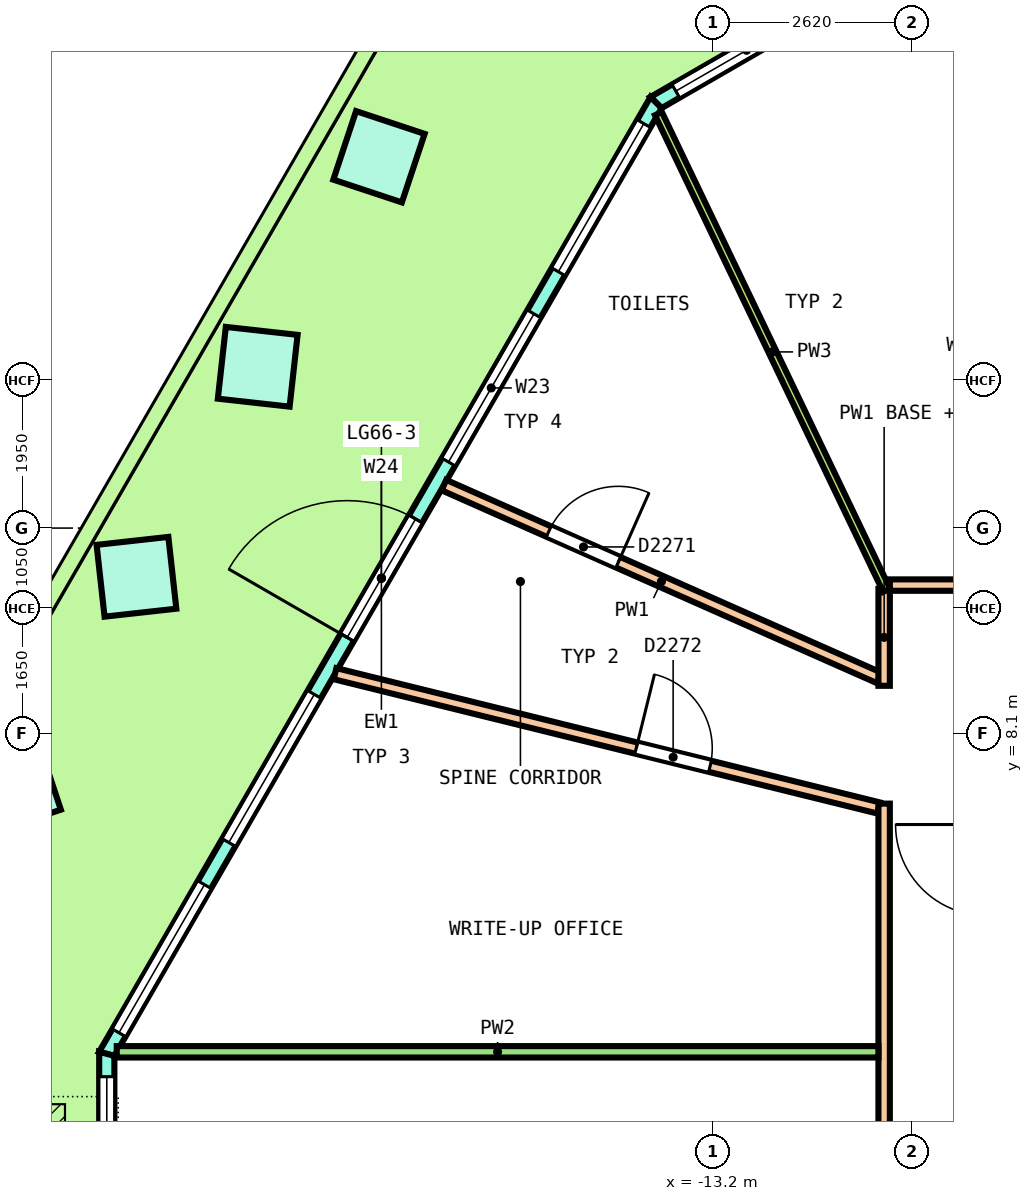
"""IFC4 building model, lengths in metres.
Left out: names, types, materials, properties, quantities, classifications, styles, units other than length and angle.
Written with IfcOpenShell. Run it as: python <this file> out.ifc"""

import sys

from ifc_helpers import new_model, si_unit, direction, frame, frame_2d, origin, origin_2d, place, context, subcontext, project, spatial, polyline, rectangle, outline, extrude, element, fill, save


model = new_model("IFC4")
c1 = context("Model", 3, precision=1e-05, world=origin(), true_north=direction((0.0, 1.0)))
c2 = subcontext(c1, "Body", "Model", "MODEL_VIEW")
j1 = project(units=[si_unit("LENGTHUNIT", "METRE"), si_unit("PLANEANGLEUNIT", "RADIAN")], contexts=[c1])
p1 = place(None, origin())
s1 = spatial("IfcSite", under=j1, at=p1, CompositionType="ELEMENT")
p2 = place(p1, origin())
s2 = spatial("IfcBuilding", under=s1, at=p2, CompositionType="ELEMENT")
p3 = place(p2, frame((0.0, 0.0, 299.0)))
s3 = spatial("IfcBuildingStorey", under=s2, at=p3, CompositionType="ELEMENT", Elevation=299.0)
p4 = place(p3, frame((-17.596, 15.685, 0.0), z_axis=(0.281574618215, -0.054168736457, 0.958009124366), x_axis=(-0.47558599124, -0.875021577667, 0.090306165648)))
e1 = element("IfcColumn", 1, at=p4, inside=s3, PredefinedType="COLUMN", context=c2, shape_type="SweptSolid", body=[
    extrude(rectangle(XDim=0.95, YDim=0.95, at=origin_2d()), origin(), (0.0, 0.0, 1.0), 3.799),
])
for number, where, z_axis, x_axis in (
    (2, (-19.191, 12.922, 0.0), (0.251, -0.109, 0.962), (-0.492, -0.87, 0.03)),
    (3, (-20.787, 10.159, 0.0), (0.22, -0.163, 0.962), (-0.507, -0.861, -0.03)),
):
    element("IfcColumn", number, at=place(p3, frame(where, z_axis=z_axis, x_axis=x_axis)), inside=s3, PredefinedType="COLUMN", context=c2, shape_type="SweptSolid", body=[
        extrude(rectangle(XDim=0.95, YDim=0.95, at=origin_2d()), origin(), (0.0, 0.0, 1.0), 3.795),
    ])
p5 = place(p3, frame((-22.382, 7.396, 0.0), z_axis=(0.187758226885, -0.216738021658, 0.958003903022), x_axis=(-0.519767268221, -0.849519403482, -0.090325909867)))
e4 = element("IfcColumn", 4, at=p5, inside=s3, PredefinedType="COLUMN", context=c2, shape_type="SweptSolid", body=[
    extrude(rectangle(XDim=0.95, YDim=0.95, at=origin_2d()), origin(), (0.0, 0.0, 1.0), 3.8),
])
p6 = place(p3, frame((-9.185, 19.15, 0.0), z_axis=(0.0, 0.0, 1.0), x_axis=(-0.866026017613, -0.499998936816, 0.0)))
e5 = element("IfcWall", 5, at=p6, inside=s3, PredefinedType="SOLIDWALL", context=c2, shape_type="SweptSolid", body=[
    extrude(outline(polyline([(-0.027, -0.1), (1.084, -0.1), (2.196, -0.1), (3.307, -0.1), (4.419, -0.1), (5.53, -0.1), (5.477, 0.1), (4.387, 0.1), (3.297, 0.1), (2.207, 0.1), (1.117, 0.1), (0.027, 0.1), (-0.027, -0.1)])), origin(), (0.0, 0.0, 1.0), 3.7),
])
p7 = place(p6, frame((0.301, 0.0, 0.1)))
e6 = element("IfcOpeningElement", 6, at=p7, cuts=e5, PredefinedType="OPENING", context=c2, shape_type="SweptSolid", body=[
    extrude(rectangle(XDim=2.15, YDim=2.75, at=frame_2d((1.075, 1.375))), frame((0.0, 0.11, 0.0), z_axis=(0.0, -1.0, 0.0), x_axis=(1.0, 0.0, 0.0)), (0.0, 0.0, 1.0), 0.22),
])
p8 = place(p6, frame((3.052, 0.0, 0.1)))
e7 = element("IfcOpeningElement", 7, at=p8, cuts=e5, PredefinedType="OPENING", context=c2, shape_type="SweptSolid", body=[
    extrude(rectangle(XDim=2.15, YDim=2.75, at=frame_2d((1.075, 1.375))), frame((0.0, 0.11, 0.0), z_axis=(0.0, -1.0, 0.0), x_axis=(1.0, 0.0, 0.0)), (0.0, 0.0, 1.0), 0.22),
])
p9 = place(p3, frame((-13.951, 16.398, 0.0), z_axis=(0.0, 0.0, 1.0), x_axis=(-0.499998359168, -0.866026351117, 0.0)))
e8 = element("IfcWall", 8, at=p9, inside=s3, PredefinedType="SOLIDWALL", context=c2, shape_type="SweptSolid", body=[
    extrude(outline(polyline([(-0.027, -0.1), (1.009, -0.1), (2.045, -0.1), (3.081, -0.1), (4.117, -0.1), (5.154, -0.1), (6.189, -0.1), (7.226, -0.1), (8.262, -0.1), (9.298, -0.1), (10.334, -0.1), (11.37, -0.1), (12.406, -0.1), (13.442, -0.1), (14.478, -0.1), (14.424, 0.1), (13.396, 0.1), (12.367, 0.1), (11.339, 0.1), (10.311, 0.1), (9.282, 0.1), (8.254, 0.1), (7.226, 0.1), (6.197, 0.1), (5.169, 0.1), (4.14, 0.1), (3.112, 0.1), (2.084, 0.1), (1.055, 0.1), (0.027, 0.1), (-0.027, -0.1)])), origin(), (0.0, 0.0, 1.0), 3.7),
])
p10 = place(p9, frame((0.32, 0.0, 0.1)))
e9 = element("IfcOpeningElement", 9, at=p10, cuts=e8, PredefinedType="OPENING", context=c2, shape_type="SweptSolid", body=[
    extrude(rectangle(XDim=2.25, YDim=2.75, at=frame_2d((1.125, 1.375))), frame((0.0, 0.11, 0.0), z_axis=(0.0, -1.0, 0.0), x_axis=(1.0, 0.0, 0.0)), (0.0, 0.0, 1.0), 0.22),
])
p11 = place(p9, frame((3.21, 0.0, 0.1)))
e10 = element("IfcOpeningElement", 10, at=p11, cuts=e8, PredefinedType="OPENING", context=c2, shape_type="SweptSolid", body=[
    extrude(rectangle(XDim=2.25, YDim=2.75, at=frame_2d((1.125, 1.375))), frame((0.0, 0.11, 0.0), z_axis=(0.0, -1.0, 0.0), x_axis=(1.0, 0.0, 0.0)), (0.0, 0.0, 1.0), 0.22),
])
p12 = place(p9, frame((6.326, 0.0, 0.0)))
e11 = element("IfcOpeningElement", 11, at=p12, cuts=e8, PredefinedType="OPENING", context=c2, shape_type="SweptSolid", body=[
    extrude(rectangle(XDim=1.8, YDim=2.4, at=frame_2d((0.9, 1.2))), frame((0.0, 0.11, 0.0), z_axis=(0.0, -1.0, 0.0), x_axis=(1.0, 0.0, 0.0)), (0.0, 0.0, 1.0), 0.22),
])
p13 = place(p9, frame((6.326, 0.0, 2.55)))
e12 = element("IfcOpeningElement", 12, at=p13, cuts=e8, PredefinedType="OPENING", context=c2, shape_type="SweptSolid", body=[
    extrude(rectangle(XDim=1.8, YDim=0.3, at=frame_2d((0.9, 0.15))), frame((0.0, 0.11, 0.0), z_axis=(0.0, -1.0, 0.0), x_axis=(1.0, 0.0, 0.0)), (0.0, 0.0, 1.0), 0.22),
])
p14 = place(p9, frame((8.991, 0.0, 0.1)))
e13 = element("IfcOpeningElement", 13, at=p14, cuts=e8, PredefinedType="OPENING", context=c2, shape_type="SweptSolid", body=[
    extrude(rectangle(XDim=2.25, YDim=2.75, at=frame_2d((1.125, 1.375))), frame((0.0, 0.11, 0.0), z_axis=(0.0, -1.0, 0.0), x_axis=(1.0, 0.0, 0.0)), (0.0, 0.0, 1.0), 0.22),
])
p15 = place(p9, frame((11.881, 0.0, 0.1)))
e14 = element("IfcOpeningElement", 14, at=p15, cuts=e8, PredefinedType="OPENING", context=c2, shape_type="SweptSolid", body=[
    extrude(rectangle(XDim=2.25, YDim=2.75, at=frame_2d((1.125, 1.375))), frame((0.0, 0.11, 0.0), z_axis=(0.0, -1.0, 0.0), x_axis=(1.0, 0.0, 0.0)), (0.0, 0.0, 1.0), 0.22),
])
p16 = place(p3, frame((-21.177, 3.883, 0.0), z_axis=(0.0, 0.0, 1.0), x_axis=(0.0, -1.0, 0.0)))
e15 = element("IfcWall", 15, at=p16, inside=s3, PredefinedType="SOLIDWALL", context=c2, shape_type="SweptSolid", body=[
    extrude(outline(polyline([(-0.027, -0.1), (1.084, -0.1), (2.196, -0.1), (3.307, -0.1), (4.419, -0.1), (5.53, -0.1), (5.477, 0.1), (4.387, 0.1), (3.297, 0.1), (2.207, 0.1), (1.117, 0.1), (0.027, 0.1), (-0.027, -0.1)])), origin(), (0.0, 0.0, 1.0), 3.7),
])
p17 = place(p16, frame((0.301, 0.0, 0.1)))
e16 = element("IfcOpeningElement", 16, at=p17, cuts=e15, PredefinedType="OPENING", context=c2, shape_type="SweptSolid", body=[
    extrude(rectangle(XDim=2.15, YDim=2.75, at=frame_2d((1.075, 1.375))), frame((0.0, 0.11, 0.0), z_axis=(0.0, -1.0, 0.0), x_axis=(1.0, 0.0, 0.0)), (0.0, 0.0, 1.0), 0.22),
])
p18 = place(p16, frame((3.052, 0.0, 0.1)))
e17 = element("IfcOpeningElement", 17, at=p18, cuts=e15, PredefinedType="OPENING", context=c2, shape_type="SweptSolid", body=[
    extrude(rectangle(XDim=2.15, YDim=2.75, at=frame_2d((1.075, 1.375))), frame((0.0, 0.11, 0.0), z_axis=(0.0, -1.0, 0.0), x_axis=(1.0, 0.0, 0.0)), (0.0, 0.0, 1.0), 0.22),
])
p19 = place(p3, frame((-16.742, 11.365, 0.0), z_axis=(0.0, 0.0, 1.0), x_axis=(0.914312665263, -0.405009074144, 0.0)))
e18 = element("IfcWall", 18, at=p19, inside=s3, PredefinedType="PARTITIONING", context=c2, shape_type="SweptSolid", body=[
    extrude(rectangle(XDim=6.26, YDim=0.15, at=frame_2d((3.13, 0.0))), origin(), (0.0, 0.0, 1.0), 2.9),
])
p20 = place(p19, frame((1.509, 0.0, 0.0)))
e19 = element("IfcOpeningElement", 19, at=p20, cuts=e18, PredefinedType="OPENING", context=c2, shape_type="SweptSolid", body=[
    extrude(rectangle(XDim=1.0, YDim=2.1, at=frame_2d((0.5, 1.05))), frame((0.0, 0.085, 0.0), z_axis=(0.0, -1.0, 0.0), x_axis=(1.0, 0.0, 0.0)), (0.0, 0.0, 1.0), 0.17),
])
p21 = place(p3, frame((-18.174, 8.885, 0.0), z_axis=(0.0, 0.0, 1.0), x_axis=(0.970815249567, -0.239828587138, 0.0)))
e20 = element("IfcWall", 20, at=p21, inside=s3, PredefinedType="PARTITIONING", context=c2, shape_type="SweptSolid", body=[
    extrude(rectangle(XDim=7.366, YDim=0.15, at=frame_2d((3.683, 0.0))), origin(), (0.0, 0.0, 1.0), 2.9),
])
p22 = place(p21, frame((4.082, 0.0, 0.0)))
e21 = element("IfcOpeningElement", 21, at=p22, cuts=e20, PredefinedType="OPENING", context=c2, shape_type="SweptSolid", body=[
    extrude(rectangle(XDim=1.0, YDim=2.1, at=frame_2d((0.5, 1.05))), frame((0.0, 0.085, 0.0), z_axis=(0.0, -1.0, 0.0), x_axis=(1.0, 0.0, 0.0)), (0.0, 0.0, 1.0), 0.17),
])
p23 = place(p3, frame((-10.875, 10.05, 0.0), z_axis=(0.0, 0.0, 1.0), x_axis=(1.0, 0.0, 0.0)))
e22 = element("IfcWall", 22, at=p23, inside=s3, PredefinedType="PARTITIONING", context=c2, shape_type="SweptSolid", body=[
    extrude(rectangle(XDim=21.775, YDim=0.15, at=frame_2d((10.887, 0.0))), origin(), (0.0, 0.0, 1.0), 2.9),
])
p24 = place(p23, frame((12.587, 0.0, 0.0)))
e23 = element("IfcOpeningElement", 23, at=p24, cuts=e22, PredefinedType="OPENING", context=c2, shape_type="SweptSolid", body=[
    extrude(rectangle(XDim=1.2, YDim=2.1, at=frame_2d((0.6, 1.05))), frame((0.0, 0.085, 0.0), z_axis=(0.0, -1.0, 0.0), x_axis=(1.0, 0.0, 0.0)), (0.0, 0.0, 1.0), 0.17),
])
p25 = place(p23, frame((6.194, 0.0, 0.0)))
e24 = element("IfcOpeningElement", 24, at=p25, cuts=e22, PredefinedType="OPENING", context=c2, shape_type="SweptSolid", body=[
    extrude(rectangle(XDim=1.0, YDim=2.1, at=frame_2d((0.5, 1.05))), frame((0.0, 0.085, 0.0), z_axis=(0.0, -1.0, 0.0), x_axis=(1.0, 0.0, 0.0)), (0.0, 0.0, 1.0), 0.17),
])
p26 = place(p23, frame((2.136, 0.0, 0.0)))
e25 = element("IfcOpeningElement", 25, at=p26, cuts=e22, PredefinedType="OPENING", context=c2, shape_type="SweptSolid", body=[
    extrude(rectangle(XDim=1.0, YDim=2.1, at=frame_2d((0.5, 1.05))), frame((0.0, 0.085, 0.0), z_axis=(0.0, -1.0, 0.0), x_axis=(1.0, 0.0, 0.0)), (0.0, 0.0, 1.0), 0.17),
])
p27 = place(p3, frame((-10.95, -9.975, 0.0), z_axis=(0.0, 0.0, 1.0), x_axis=(0.0, 1.0, 0.0)))
e26 = element("IfcWall", 26, at=p27, inside=s3, PredefinedType="PARTITIONING", context=c2, shape_type="SweptSolid", body=[
    extrude(rectangle(XDim=17.15, YDim=0.15, at=frame_2d((8.575, 0.0))), origin(), (0.0, 0.0, 1.0), 2.9),
])
p28 = place(p27, frame((9.938, 0.0, 0.0)))
e27 = element("IfcOpeningElement", 27, at=p28, cuts=e26, PredefinedType="OPENING", context=c2, shape_type="SweptSolid", body=[
    extrude(rectangle(XDim=1.2, YDim=2.1, at=frame_2d((0.6, 1.05))), frame((0.0, 0.085, 0.0), z_axis=(0.0, -1.0, 0.0), x_axis=(1.0, 0.0, 0.0)), (0.0, 0.0, 1.0), 0.17),
])
p29 = place(p27, frame((2.427, 0.0, 0.0)))
e28 = element("IfcOpeningElement", 28, at=p29, cuts=e26, PredefinedType="OPENING", context=c2, shape_type="SweptSolid", body=[
    extrude(rectangle(XDim=1.2, YDim=2.1, at=frame_2d((0.6, 1.05))), frame((0.0, 0.085, 0.0), z_axis=(0.0, -1.0, 0.0), x_axis=(1.0, 0.0, 0.0)), (0.0, 0.0, 1.0), 0.17),
])
p30 = place(p3, frame((-10.95, 8.725, 0.0), z_axis=(0.0, 0.0, 1.0), x_axis=(0.0, 1.0, 0.0)))
e29 = element("IfcWall", 29, at=p30, inside=s3, PredefinedType="PARTITIONING", context=c2, shape_type="SweptSolid", body=[
    extrude(rectangle(XDim=1.275, YDim=0.15, at=frame_2d((0.637, 0.0))), origin(), (0.0, 0.0, 1.0), 3.65),
])
p31 = place(p3, frame((-21.046, 3.91, 0.0), z_axis=(0.0, 0.0, 1.0), x_axis=(1.0, 0.0, 0.0)))
e30 = element("IfcWall", 30, at=p31, inside=s3, PredefinedType="PARTITIONING", context=c2, shape_type="SweptSolid", body=[
    extrude(rectangle(XDim=10.021, YDim=0.15, at=frame_2d((5.011, 0.0))), origin(), (0.0, 0.0, 1.0), 2.9),
])
p32 = place(p3, frame((-13.92, 16.253, 0.0), z_axis=(0.0, 0.0, 1.0), x_axis=(0.43187918696, -0.901931465174, 0.0)))
e31 = element("IfcWall", 31, at=p32, inside=s3, PredefinedType="PARTITIONING", context=c2, shape_type="SweptSolid", body=[
    extrude(rectangle(XDim=6.952, YDim=0.1, at=frame_2d((3.476, 0.0))), origin(), (0.0, 0.0, 1.0), 2.9),
])
p33 = place(p8, origin())
e32 = element("IfcWindow", 32, at=p33, inside=s3, PartitioningType="SINGLE_PANEL", PredefinedType="WINDOW", context=c2, shape_type="SweptSolid", body=[
    extrude(rectangle(XDim=2.15, YDim=2.75, at=frame_2d((1.075, 1.375))), frame((0.0, 0.03, 0.0), z_axis=(0.0, -1.0, 0.0), x_axis=(1.0, 0.0, 0.0)), (0.0, 0.0, 1.0), 0.06),
])
fill(e7, e32)
p34 = place(p10, origin())
e33 = element("IfcWindow", 33, at=p34, inside=s3, PartitioningType="SINGLE_PANEL", PredefinedType="WINDOW", context=c2, shape_type="SweptSolid", body=[
    extrude(rectangle(XDim=2.25, YDim=2.75, at=frame_2d((1.125, 1.375))), frame((0.0, 0.03, 0.0), z_axis=(0.0, -1.0, 0.0), x_axis=(1.0, 0.0, 0.0)), (0.0, 0.0, 1.0), 0.06),
])
fill(e9, e33)
p35 = place(p11, origin())
e34 = element("IfcWindow", 34, at=p35, inside=s3, PartitioningType="SINGLE_PANEL", PredefinedType="WINDOW", context=c2, shape_type="SweptSolid", body=[
    extrude(rectangle(XDim=2.25, YDim=2.75, at=frame_2d((1.125, 1.375))), frame((0.0, 0.03, 0.0), z_axis=(0.0, -1.0, 0.0), x_axis=(1.0, 0.0, 0.0)), (0.0, 0.0, 1.0), 0.06),
])
fill(e10, e34)
p36 = place(p12, origin())
e35 = element("IfcDoor", 35, at=p36, inside=s3, OperationType="DOUBLE_DOOR_SINGLE_SWING", PredefinedType="DOOR", context=c2, shape_type="SweptSolid", body=[
    extrude(rectangle(XDim=1.8, YDim=2.4, at=frame_2d((0.9, 1.2))), frame((0.0, 0.025, 0.0), z_axis=(0.0, -1.0, 0.0), x_axis=(1.0, 0.0, 0.0)), (0.0, 0.0, 1.0), 0.05),
])
fill(e11, e35)
p37 = place(p13, origin())
e36 = element("IfcWindow", 36, at=p37, inside=s3, PartitioningType="SINGLE_PANEL", PredefinedType="WINDOW", context=c2, shape_type="SweptSolid", body=[
    extrude(rectangle(XDim=1.8, YDim=0.3, at=frame_2d((0.9, 0.15))), frame((0.0, 0.03, 0.0), z_axis=(0.0, -1.0, 0.0), x_axis=(1.0, 0.0, 0.0)), (0.0, 0.0, 1.0), 0.06),
])
fill(e12, e36)
p38 = place(p14, origin())
e37 = element("IfcWindow", 37, at=p38, inside=s3, PartitioningType="SINGLE_PANEL", PredefinedType="WINDOW", context=c2, shape_type="SweptSolid", body=[
    extrude(rectangle(XDim=2.25, YDim=2.75, at=frame_2d((1.125, 1.375))), frame((0.0, 0.03, 0.0), z_axis=(0.0, -1.0, 0.0), x_axis=(1.0, 0.0, 0.0)), (0.0, 0.0, 1.0), 0.06),
])
fill(e13, e37)
p39 = place(p15, origin())
e38 = element("IfcWindow", 38, at=p39, inside=s3, PartitioningType="SINGLE_PANEL", PredefinedType="WINDOW", context=c2, shape_type="SweptSolid", body=[
    extrude(rectangle(XDim=2.25, YDim=2.75, at=frame_2d((1.125, 1.375))), frame((0.0, 0.03, 0.0), z_axis=(0.0, -1.0, 0.0), x_axis=(1.0, 0.0, 0.0)), (0.0, 0.0, 1.0), 0.06),
])
fill(e14, e38)
p40 = place(p17, origin())
e39 = element("IfcWindow", 39, at=p40, inside=s3, PartitioningType="SINGLE_PANEL", PredefinedType="WINDOW", context=c2, shape_type="SweptSolid", body=[
    extrude(rectangle(XDim=2.15, YDim=2.75, at=frame_2d((1.075, 1.375))), frame((0.0, 0.03, 0.0), z_axis=(0.0, -1.0, 0.0), x_axis=(1.0, 0.0, 0.0)), (0.0, 0.0, 1.0), 0.06),
])
fill(e16, e39)
p41 = place(p20, origin())
e40 = element("IfcDoor", 40, at=p41, inside=s3, OperationType="SINGLE_SWING_LEFT", PredefinedType="DOOR", context=c2, shape_type="SweptSolid", body=[
    extrude(rectangle(XDim=1.0, YDim=2.1, at=frame_2d((0.5, 1.05))), frame((0.0, 0.025, 0.0), z_axis=(0.0, -1.0, 0.0), x_axis=(1.0, 0.0, 0.0)), (0.0, 0.0, 1.0), 0.05),
])
fill(e19, e40)
p42 = place(p22, origin())
e41 = element("IfcDoor", 41, at=p42, inside=s3, OperationType="SINGLE_SWING_RIGHT", PredefinedType="DOOR", context=c2, shape_type="SweptSolid", body=[
    extrude(rectangle(XDim=1.0, YDim=2.1, at=frame_2d((0.5, 1.05))), frame((0.0, 0.025, 0.0), z_axis=(0.0, -1.0, 0.0), x_axis=(1.0, 0.0, 0.0)), (0.0, 0.0, 1.0), 0.05),
])
fill(e21, e41)
save(model, sys.argv[1])
